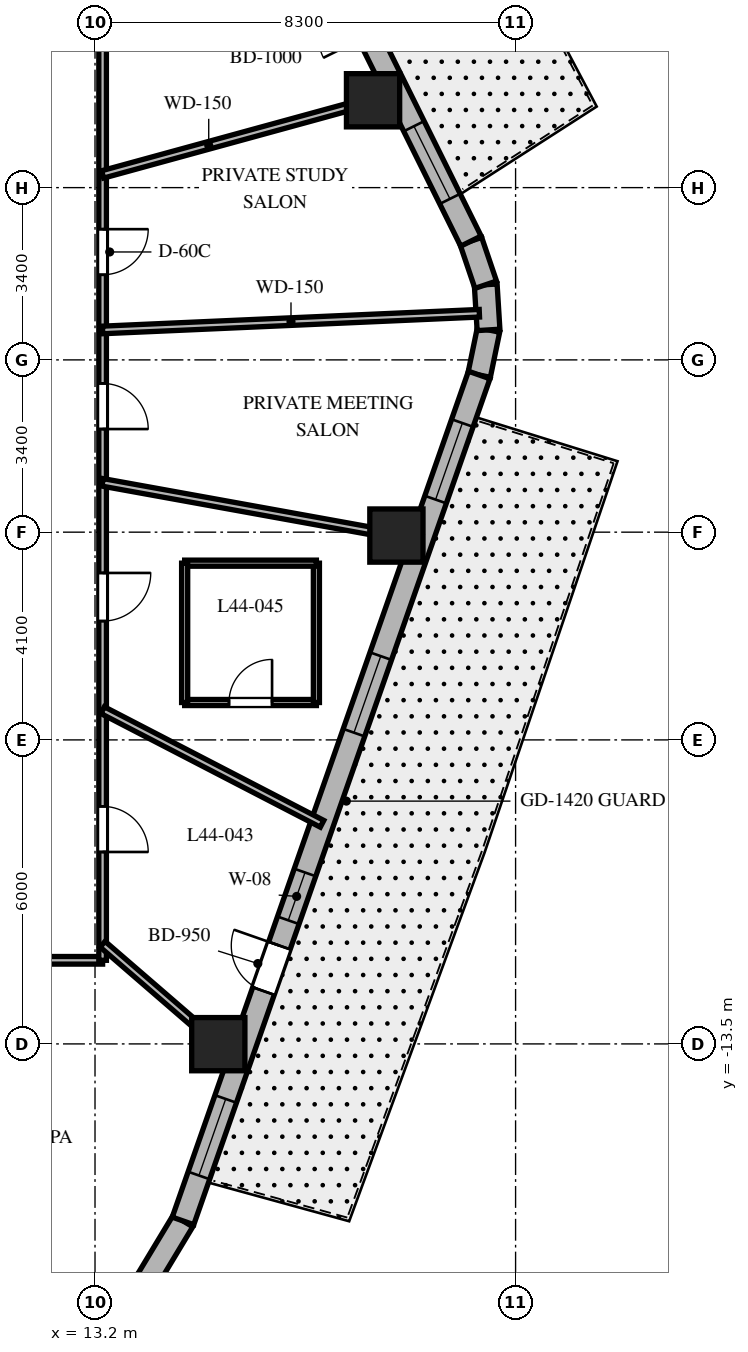
"""IFC4 building model, lengths in metres.
Left out: names, types, materials, properties, quantities, classifications, styles, units other than length and angle.
Written with IfcOpenShell. Run it as: python <this file> out.ifc"""

import sys

from ifc_helpers import new_model, si_unit, direction, frame, frame_2d, origin, origin_2d, place, context, subcontext, project, spatial, rectangle, extrude, element, fill, save


model = new_model("IFC4")
c1 = context("Model", 3, precision=1e-05, world=origin(), true_north=direction((0.0, 1.0)))
c2 = subcontext(c1, "Body", "Model", "MODEL_VIEW")
j1 = project(units=[si_unit("LENGTHUNIT", "METRE"), si_unit("PLANEANGLEUNIT", "RADIAN")], contexts=[c1])
p1 = place(None, origin())
s1 = spatial("IfcSite", under=j1, at=p1, CompositionType="ELEMENT")
p2 = place(p1, origin())
s2 = spatial("IfcBuilding", under=s1, at=p2, CompositionType="ELEMENT")
p3 = place(p2, frame((0.0, 0.0, 179.3)))
s3 = spatial("IfcBuildingStorey", under=s2, at=p3, CompositionType="ELEMENT", Elevation=179.3)
for number, where, z_axis, x_axis in (
    (1, (15.633, -13.505, 0.0), (0.0, 0.0, 1.0), (1.0, 0.0, 0.0)),
    (2, (19.148, -3.467, 0.0), (0.0, 0.0, 1.0), (1.0, 0.0, 0.0)),
    (3, (18.687, 5.124, 0.0), (0.0, 0.0, 1.0), (1.0, 0.0, 0.0)),
):
    element("IfcColumn", number, at=place(p3, frame(where, z_axis=z_axis, x_axis=x_axis)), inside=s3, PredefinedType="COLUMN", context=c2, shape_type="SweptSolid", body=[
        extrude(rectangle(XDim=1.05, YDim=1.05, at=origin_2d()), origin(), (0.0, 0.0, 1.0), 3.7),
    ])
p4 = place(p3, frame((14.214, -18.192, 0.0), z_axis=(0.0, 0.0, 1.0), x_axis=(0.516340945502, 0.856383108193, 0.0)))
e4 = element("IfcWall", 4, at=p4, inside=s3, PredefinedType="SOLIDWALL", context=c2, shape_type="SweptSolid", body=[
    extrude(rectangle(XDim=1.4, YDim=0.45, at=frame_2d((0.7, 0.0))), origin(), (0.0, 0.0, 1.0), 3.4),
])
p5 = place(p3, frame((20.782, -0.298, 0.0), z_axis=(0.0, 0.0, 1.0), x_axis=(0.202570068411, 0.979267771033, 0.0)))
e5 = element("IfcWall", 5, at=p5, inside=s3, PredefinedType="SOLIDWALL", context=c2, shape_type="SweptSolid", body=[
    extrude(rectangle(XDim=0.909, YDim=0.45, at=frame_2d((0.454, 0.0))), origin(), (0.0, 0.0, 1.0), 3.4),
])
p6 = place(p3, frame((20.966, 0.592, 0.0), z_axis=(0.0, 0.0, 1.0), x_axis=(-0.061748898935, 0.998091715966, 0.0)))
e6 = element("IfcWall", 6, at=p6, inside=s3, PredefinedType="SOLIDWALL", context=c2, shape_type="SweptSolid", body=[
    extrude(rectangle(XDim=0.894, YDim=0.45, at=frame_2d((0.447, 0.0))), origin(), (0.0, 0.0, 1.0), 3.4),
])
p7 = place(p3, frame((20.911, 1.484, 0.0), z_axis=(0.0, 0.0, 1.0), x_axis=(-0.321623334353, 0.946867694453, 0.0)))
e7 = element("IfcWall", 7, at=p7, inside=s3, PredefinedType="SOLIDWALL", context=c2, shape_type="SweptSolid", body=[
    extrude(rectangle(XDim=0.909, YDim=0.45, at=frame_2d((0.454, 0.0))), origin(), (0.0, 0.0, 1.0), 3.4),
])
p8 = place(p3, frame((14.937, -16.993, 0.0), z_axis=(0.0, 0.0, 1.0), x_axis=(0.330431575061, 0.943829949834, 0.0)))
e8 = element("IfcWall", 8, at=p8, inside=s3, PredefinedType="SOLIDWALL", context=c2, shape_type="SweptSolid", body=[
    extrude(rectangle(XDim=17.689, YDim=0.45, at=frame_2d((8.844, 0.0))), origin(), (0.0, 0.0, 1.0), 3.4),
])
p9 = place(p8, frame((4.807, 0.0, 0.0)))
e9 = element("IfcOpeningElement", 9, at=p9, cuts=e8, PredefinedType="OPENING", context=c2, shape_type="SweptSolid", body=[
    extrude(rectangle(XDim=0.95, YDim=2.15, at=frame_2d((0.475, 1.075))), frame((0.0, 0.235, 0.0), z_axis=(0.0, -1.0, 0.0), x_axis=(1.0, 0.0, 0.0)), (0.0, 0.0, 1.0), 0.47),
])
p10 = place(p8, frame((0.95, 0.0, 0.8)))
e10 = element("IfcOpeningElement", 10, at=p10, cuts=e8, PredefinedType="OPENING", context=c2, shape_type="SweptSolid", body=[
    extrude(rectangle(XDim=1.6, YDim=1.75, at=frame_2d((0.8, 0.875))), frame((0.0, 0.235, 0.0), z_axis=(0.0, -1.0, 0.0), x_axis=(1.0, 0.0, 0.0)), (0.0, 0.0, 1.0), 0.47),
])
p11 = place(p8, frame((6.286, 0.0, 0.8)))
e11 = element("IfcOpeningElement", 11, at=p11, cuts=e8, PredefinedType="OPENING", context=c2, shape_type="SweptSolid", body=[
    extrude(rectangle(XDim=1.0, YDim=1.65, at=frame_2d((0.5, 0.825))), frame((0.0, 0.235, 0.0), z_axis=(0.0, -1.0, 0.0), x_axis=(1.0, 0.0, 0.0)), (0.0, 0.0, 1.0), 0.47),
])
p12 = place(p8, frame((10.21, 0.0, 0.8)))
e12 = element("IfcOpeningElement", 12, at=p12, cuts=e8, PredefinedType="OPENING", context=c2, shape_type="SweptSolid", body=[
    extrude(rectangle(XDim=1.6, YDim=1.75, at=frame_2d((0.8, 0.875))), frame((0.0, 0.235, 0.0), z_axis=(0.0, -1.0, 0.0), x_axis=(1.0, 0.0, 0.0)), (0.0, 0.0, 1.0), 0.47),
])
p13 = place(p8, frame((15.084, 0.0, 0.8)))
e13 = element("IfcOpeningElement", 13, at=p13, cuts=e8, PredefinedType="OPENING", context=c2, shape_type="SweptSolid", body=[
    extrude(rectangle(XDim=1.6, YDim=1.75, at=frame_2d((0.8, 0.875))), frame((0.0, 0.235, 0.0), z_axis=(0.0, -1.0, 0.0), x_axis=(1.0, 0.0, 0.0)), (0.0, 0.0, 1.0), 0.47),
])
p14 = place(p3, frame((20.618, 2.344, 0.0), z_axis=(0.0, 0.0, 1.0), x_axis=(-0.444243691097, 0.895905990002, 0.0)))
e14 = element("IfcWall", 14, at=p14, inside=s3, PredefinedType="SOLIDWALL", context=c2, shape_type="SweptSolid", body=[
    extrude(rectangle(XDim=16.784, YDim=0.45, at=frame_2d((8.392, 0.0))), origin(), (0.0, 0.0, 1.0), 3.4),
])
p15 = place(p14, frame((4.535, 0.0, 0.0)))
e15 = element("IfcOpeningElement", 15, at=p15, cuts=e14, PredefinedType="OPENING", context=c2, shape_type="SweptSolid", body=[
    extrude(rectangle(XDim=1.0, YDim=2.15, at=frame_2d((0.5, 1.075))), frame((0.0, 0.235, 0.0), z_axis=(0.0, -1.0, 0.0), x_axis=(1.0, 0.0, 0.0)), (0.0, 0.0, 1.0), 0.47),
])
p16 = place(p14, frame((0.931, 0.0, 0.8)))
e16 = element("IfcOpeningElement", 16, at=p16, cuts=e14, PredefinedType="OPENING", context=c2, shape_type="SweptSolid", body=[
    extrude(rectangle(XDim=1.6, YDim=1.75, at=frame_2d((0.8, 0.875))), frame((0.0, 0.235, 0.0), z_axis=(0.0, -1.0, 0.0), x_axis=(1.0, 0.0, 0.0)), (0.0, 0.0, 1.0), 0.47),
])
p17 = place(p14, frame((7.642, 0.0, 0.8)))
e17 = element("IfcOpeningElement", 17, at=p17, cuts=e14, PredefinedType="OPENING", context=c2, shape_type="SweptSolid", body=[
    extrude(rectangle(XDim=1.6, YDim=1.75, at=frame_2d((0.8, 0.875))), frame((0.0, 0.235, 0.0), z_axis=(0.0, -1.0, 0.0), x_axis=(1.0, 0.0, 0.0)), (0.0, 0.0, 1.0), 0.47),
])
p18 = place(p14, frame((14.303, 0.0, 0.8)))
e18 = element("IfcOpeningElement", 18, at=p18, cuts=e14, PredefinedType="OPENING", context=c2, shape_type="SweptSolid", body=[
    extrude(rectangle(XDim=1.6, YDim=1.75, at=frame_2d((0.8, 0.875))), frame((0.0, 0.235, 0.0), z_axis=(0.0, -1.0, 0.0), x_axis=(1.0, 0.0, 0.0)), (0.0, 0.0, 1.0), 0.47),
])
p19 = place(p3, frame((13.35, -11.85, 0.0), z_axis=(0.0, 0.0, 1.0), x_axis=(-1.0, 0.0, 0.0)))
e19 = element("IfcWall", 19, at=p19, inside=s3, PredefinedType="PARTITIONING", context=c2, shape_type="SweptSolid", body=[
    extrude(rectangle(XDim=26.7, YDim=0.15, at=frame_2d((13.35, 0.0))), origin(), (0.0, 0.0, 1.0), 2.84),
])
p20 = place(p19, frame((22.7, 0.0, 0.0)))
e20 = element("IfcOpeningElement", 20, at=p20, cuts=e19, PredefinedType="OPENING", context=c2, shape_type="SweptSolid", body=[
    extrude(rectangle(XDim=0.9, YDim=2.03, at=frame_2d((0.45, 1.015))), frame((0.0, 0.085, 0.0), z_axis=(0.0, -1.0, 0.0), x_axis=(1.0, 0.0, 0.0)), (0.0, 0.0, 1.0), 0.17),
])
p21 = place(p19, frame((18.523, 0.0, 0.0)))
e21 = element("IfcOpeningElement", 21, at=p21, cuts=e19, PredefinedType="OPENING", context=c2, shape_type="SweptSolid", body=[
    extrude(rectangle(XDim=0.95, YDim=2.03, at=frame_2d((0.475, 1.015))), frame((0.0, 0.085, 0.0), z_axis=(0.0, -1.0, 0.0), x_axis=(1.0, 0.0, 0.0)), (0.0, 0.0, 1.0), 0.17),
])
p22 = place(p19, frame((14.469, 0.0, 0.0)))
e22 = element("IfcOpeningElement", 22, at=p22, cuts=e19, PredefinedType="OPENING", context=c2, shape_type="SweptSolid", body=[
    extrude(rectangle(XDim=0.95, YDim=2.03, at=frame_2d((0.475, 1.015))), frame((0.0, 0.085, 0.0), z_axis=(0.0, -1.0, 0.0), x_axis=(1.0, 0.0, 0.0)), (0.0, 0.0, 1.0), 0.17),
])
p23 = place(p19, frame((10.314, 0.0, 0.0)))
e23 = element("IfcOpeningElement", 23, at=p23, cuts=e19, PredefinedType="OPENING", context=c2, shape_type="SweptSolid", body=[
    extrude(rectangle(XDim=0.95, YDim=2.03, at=frame_2d((0.475, 1.015))), frame((0.0, 0.085, 0.0), z_axis=(0.0, -1.0, 0.0), x_axis=(1.0, 0.0, 0.0)), (0.0, 0.0, 1.0), 0.17),
])
p24 = place(p19, frame((3.995, 0.0, 0.0)))
e24 = element("IfcOpeningElement", 24, at=p24, cuts=e19, PredefinedType="OPENING", context=c2, shape_type="SweptSolid", body=[
    extrude(rectangle(XDim=0.95, YDim=2.03, at=frame_2d((0.475, 1.015))), frame((0.0, 0.085, 0.0), z_axis=(0.0, -1.0, 0.0), x_axis=(1.0, 0.0, 0.0)), (0.0, 0.0, 1.0), 0.17),
])
p25 = place(p3, frame((13.35, 11.85, 0.0), z_axis=(0.0, 0.0, 1.0), x_axis=(0.0, -1.0, 0.0)))
e25 = element("IfcWall", 25, at=p25, inside=s3, PredefinedType="PARTITIONING", context=c2, shape_type="SweptSolid", body=[
    extrude(rectangle(XDim=23.7, YDim=0.15, at=frame_2d((11.85, 0.0))), origin(), (0.0, 0.0, 1.0), 2.84),
])
p26 = place(p25, frame((9.27, 0.0, 0.0)))
e26 = element("IfcOpeningElement", 26, at=p26, cuts=e25, PredefinedType="OPENING", context=c2, shape_type="SweptSolid", body=[
    extrude(rectangle(XDim=0.9, YDim=2.03, at=frame_2d((0.45, 1.015))), frame((0.0, 0.085, 0.0), z_axis=(0.0, -1.0, 0.0), x_axis=(1.0, 0.0, 0.0)), (0.0, 0.0, 1.0), 0.17),
])
p27 = place(p25, frame((3.765, 0.0, 0.0)))
e27 = element("IfcOpeningElement", 27, at=p27, cuts=e25, PredefinedType="OPENING", context=c2, shape_type="SweptSolid", body=[
    extrude(rectangle(XDim=0.9, YDim=2.03, at=frame_2d((0.45, 1.015))), frame((0.0, 0.085, 0.0), z_axis=(0.0, -1.0, 0.0), x_axis=(1.0, 0.0, 0.0)), (0.0, 0.0, 1.0), 0.17),
])
p28 = place(p25, frame((20.662, 0.0, 0.0)))
e28 = element("IfcOpeningElement", 28, at=p28, cuts=e25, PredefinedType="OPENING", context=c2, shape_type="SweptSolid", body=[
    extrude(rectangle(XDim=0.9, YDim=2.03, at=frame_2d((0.45, 1.015))), frame((0.0, 0.085, 0.0), z_axis=(0.0, -1.0, 0.0), x_axis=(1.0, 0.0, 0.0)), (0.0, 0.0, 1.0), 0.17),
])
p29 = place(p25, frame((16.055, 0.0, 0.0)))
e29 = element("IfcOpeningElement", 29, at=p29, cuts=e25, PredefinedType="OPENING", context=c2, shape_type="SweptSolid", body=[
    extrude(rectangle(XDim=0.95, YDim=2.03, at=frame_2d((0.475, 1.015))), frame((0.0, 0.085, 0.0), z_axis=(0.0, -1.0, 0.0), x_axis=(1.0, 0.0, 0.0)), (0.0, 0.0, 1.0), 0.17),
])
p30 = place(p25, frame((12.315, 0.0, 0.0)))
e30 = element("IfcOpeningElement", 30, at=p30, cuts=e25, PredefinedType="OPENING", context=c2, shape_type="SweptSolid", body=[
    extrude(rectangle(XDim=0.9, YDim=2.03, at=frame_2d((0.45, 1.015))), frame((0.0, 0.085, 0.0), z_axis=(0.0, -1.0, 0.0), x_axis=(1.0, 0.0, 0.0)), (0.0, 0.0, 1.0), 0.17),
])
p31 = place(p3, frame((13.35, 0.591, 0.0), z_axis=(0.0, 0.0, 1.0), x_axis=(0.999020359631, 0.044252921296, 0.0)))
e31 = element("IfcWall", 31, at=p31, inside=s3, PredefinedType="PARTITIONING", context=c2, shape_type="SweptSolid", body=[
    extrude(rectangle(XDim=7.442, YDim=0.15, at=frame_2d((3.721, 0.0))), origin(), (0.0, 0.0, 1.0), 2.64),
])
p32 = place(p3, frame((13.35, 3.661, 0.0), z_axis=(0.0, 0.0, 1.0), x_axis=(0.964397145454, 0.264458211898, 0.0)))
e32 = element("IfcWall", 32, at=p32, inside=s3, PredefinedType="PARTITIONING", context=c2, shape_type="SweptSolid", body=[
    extrude(rectangle(XDim=6.039, YDim=0.15, at=frame_2d((3.019, 0.0))), origin(), (0.0, 0.0, 1.0), 2.64),
])
p33 = place(p3, frame((13.35, -11.533, 0.0), z_axis=(0.0, 0.0, 1.0), x_axis=(0.756711647314, -0.65374879183, 0.0)))
e33 = element("IfcWall", 33, at=p33, inside=s3, PredefinedType="PARTITIONING", context=c2, shape_type="SweptSolid", body=[
    extrude(rectangle(XDim=3.55, YDim=0.15, at=frame_2d((1.775, 0.0))), origin(), (0.0, 0.0, 1.0), 2.64),
])
p34 = place(p3, frame((13.35, -6.913, 0.0), z_axis=(0.0, 0.0, 1.0), x_axis=(0.887989298603, -0.459864116415, 0.0)))
e34 = element("IfcWall", 34, at=p34, inside=s3, PredefinedType="PARTITIONING", context=c2, shape_type="SweptSolid", body=[
    extrude(rectangle(XDim=4.877, YDim=0.15, at=frame_2d((2.438, 0.0))), origin(), (0.0, 0.0, 1.0), 2.64),
])
p35 = place(p3, frame((13.35, -2.417, 0.0), z_axis=(0.0, 0.0, 1.0), x_axis=(0.98399796473, -0.178179699761, 0.0)))
e35 = element("IfcWall", 35, at=p35, inside=s3, PredefinedType="PARTITIONING", context=c2, shape_type="SweptSolid", body=[
    extrude(rectangle(XDim=6.393, YDim=0.15, at=frame_2d((3.197, 0.0))), origin(), (0.0, 0.0, 1.0), 2.64),
])
p36 = place(p3, frame((14.969, -6.762, 0.0), z_axis=(0.0, 0.0, 1.0), x_axis=(1.0, 0.0, 0.0)))
e36 = element("IfcWall", 36, at=p36, inside=s3, PredefinedType="PARTITIONING", context=c2, shape_type="SweptSolid", body=[
    extrude(rectangle(XDim=2.6, YDim=0.12, at=frame_2d((1.3, 0.0))), origin(), (0.0, 0.0, 1.0), 2.972),
])
p37 = place(p36, frame((0.875, 0.0, 0.0)))
e37 = element("IfcOpeningElement", 37, at=p37, cuts=e36, PredefinedType="OPENING", context=c2, shape_type="SweptSolid", body=[
    extrude(rectangle(XDim=0.85, YDim=2.03, at=frame_2d((0.425, 1.015))), frame((0.0, 0.07, 0.0), z_axis=(0.0, -1.0, 0.0), x_axis=(1.0, 0.0, 0.0)), (0.0, 0.0, 1.0), 0.14),
])
p38 = place(p3, frame((17.569, -6.762, 0.0), z_axis=(0.0, 0.0, 1.0), x_axis=(0.0, 1.0, 0.0)))
e38 = element("IfcWall", 38, at=p38, inside=s3, PredefinedType="PARTITIONING", context=c2, shape_type="SweptSolid", body=[
    extrude(rectangle(XDim=2.75, YDim=0.12, at=frame_2d((1.375, 0.0))), origin(), (0.0, 0.0, 1.0), 2.84),
])
p39 = place(p3, frame((17.569, -4.012, 0.0), z_axis=(0.0, 0.0, 1.0), x_axis=(-1.0, 0.0, 0.0)))
e39 = element("IfcWall", 39, at=p39, inside=s3, PredefinedType="PARTITIONING", context=c2, shape_type="SweptSolid", body=[
    extrude(rectangle(XDim=2.6, YDim=0.12, at=frame_2d((1.3, 0.0))), origin(), (0.0, 0.0, 1.0), 2.84),
])
p40 = place(p3, frame((14.969, -4.012, 0.0), z_axis=(0.0, 0.0, 1.0), x_axis=(0.0, -1.0, 0.0)))
e40 = element("IfcWall", 40, at=p40, inside=s3, PredefinedType="PARTITIONING", context=c2, shape_type="SweptSolid", body=[
    extrude(rectangle(XDim=2.75, YDim=0.12, at=frame_2d((1.375, 0.0))), origin(), (0.0, 0.0, 1.0), 2.84),
])
p41 = place(p9, origin())
e41 = element("IfcDoor", 41, at=p41, inside=s3, OperationType="SINGLE_SWING_RIGHT", PredefinedType="DOOR", context=c2, shape_type="SweptSolid", body=[
    extrude(rectangle(XDim=0.95, YDim=2.15, at=frame_2d((0.475, 1.075))), frame((0.0, 0.025, 0.0), z_axis=(0.0, -1.0, 0.0), x_axis=(1.0, 0.0, 0.0)), (0.0, 0.0, 1.0), 0.05),
])
fill(e9, e41)
p42 = place(p10, origin())
e42 = element("IfcWindow", 42, at=p42, inside=s3, PartitioningType="SINGLE_PANEL", PredefinedType="WINDOW", context=c2, shape_type="SweptSolid", body=[
    extrude(rectangle(XDim=1.6, YDim=1.75, at=frame_2d((0.8, 0.875))), frame((0.0, 0.03, 0.0), z_axis=(0.0, -1.0, 0.0), x_axis=(1.0, 0.0, 0.0)), (0.0, 0.0, 1.0), 0.06),
])
fill(e10, e42)
p43 = place(p11, origin())
e43 = element("IfcWindow", 43, at=p43, inside=s3, PartitioningType="SINGLE_PANEL", PredefinedType="WINDOW", context=c2, shape_type="SweptSolid", body=[
    extrude(rectangle(XDim=1.0, YDim=1.65, at=frame_2d((0.5, 0.825))), frame((0.0, 0.03, 0.0), z_axis=(0.0, -1.0, 0.0), x_axis=(1.0, 0.0, 0.0)), (0.0, 0.0, 1.0), 0.06),
])
fill(e11, e43)
p44 = place(p12, origin())
e44 = element("IfcWindow", 44, at=p44, inside=s3, PartitioningType="SINGLE_PANEL", PredefinedType="WINDOW", context=c2, shape_type="SweptSolid", body=[
    extrude(rectangle(XDim=1.6, YDim=1.75, at=frame_2d((0.8, 0.875))), frame((0.0, 0.03, 0.0), z_axis=(0.0, -1.0, 0.0), x_axis=(1.0, 0.0, 0.0)), (0.0, 0.0, 1.0), 0.06),
])
fill(e12, e44)
p45 = place(p13, origin())
e45 = element("IfcWindow", 45, at=p45, inside=s3, PartitioningType="SINGLE_PANEL", PredefinedType="WINDOW", context=c2, shape_type="SweptSolid", body=[
    extrude(rectangle(XDim=1.6, YDim=1.75, at=frame_2d((0.8, 0.875))), frame((0.0, 0.03, 0.0), z_axis=(0.0, -1.0, 0.0), x_axis=(1.0, 0.0, 0.0)), (0.0, 0.0, 1.0), 0.06),
])
fill(e13, e45)
p46 = place(p16, origin())
e46 = element("IfcWindow", 46, at=p46, inside=s3, PartitioningType="SINGLE_PANEL", PredefinedType="WINDOW", context=c2, shape_type="SweptSolid", body=[
    extrude(rectangle(XDim=1.6, YDim=1.75, at=frame_2d((0.8, 0.875))), frame((0.0, 0.03, 0.0), z_axis=(0.0, -1.0, 0.0), x_axis=(1.0, 0.0, 0.0)), (0.0, 0.0, 1.0), 0.06),
])
fill(e16, e46)
p47 = place(p26, origin())
e47 = element("IfcDoor", 47, at=p47, inside=s3, OperationType="SINGLE_SWING_LEFT", PredefinedType="DOOR", context=c2, shape_type="SweptSolid", body=[
    extrude(rectangle(XDim=0.9, YDim=2.03, at=frame_2d((0.45, 1.015))), frame((0.0, 0.025, 0.0), z_axis=(0.0, -1.0, 0.0), x_axis=(1.0, 0.0, 0.0)), (0.0, 0.0, 1.0), 0.05),
])
fill(e26, e47)
p48 = place(p28, origin())
e48 = element("IfcDoor", 48, at=p48, inside=s3, OperationType="SINGLE_SWING_RIGHT", PredefinedType="DOOR", context=c2, shape_type="SweptSolid", body=[
    extrude(rectangle(XDim=0.9, YDim=2.03, at=frame_2d((0.45, 1.015))), frame((0.0, 0.025, 0.0), z_axis=(0.0, -1.0, 0.0), x_axis=(1.0, 0.0, 0.0)), (0.0, 0.0, 1.0), 0.05),
])
fill(e28, e48)
p49 = place(p29, origin())
e49 = element("IfcDoor", 49, at=p49, inside=s3, OperationType="SINGLE_SWING_LEFT", PredefinedType="DOOR", context=c2, shape_type="SweptSolid", body=[
    extrude(rectangle(XDim=0.95, YDim=2.03, at=frame_2d((0.475, 1.015))), frame((0.0, 0.025, 0.0), z_axis=(0.0, -1.0, 0.0), x_axis=(1.0, 0.0, 0.0)), (0.0, 0.0, 1.0), 0.05),
])
fill(e29, e49)
p50 = place(p37, origin())
e50 = element("IfcDoor", 50, at=p50, inside=s3, OperationType="SINGLE_SWING_RIGHT", PredefinedType="DOOR", context=c2, shape_type="SweptSolid", body=[
    extrude(rectangle(XDim=0.85, YDim=2.03, at=frame_2d((0.425, 1.015))), frame((0.0, 0.025, 0.0), z_axis=(0.0, -1.0, 0.0), x_axis=(1.0, 0.0, 0.0)), (0.0, 0.0, 1.0), 0.05),
])
fill(e37, e50)
p51 = place(p30, origin())
e51 = element("IfcDoor", 51, at=p51, inside=s3, OperationType="SINGLE_SWING_RIGHT", PredefinedType="DOOR", context=c2, shape_type="SweptSolid", body=[
    extrude(rectangle(XDim=0.9, YDim=2.03, at=frame_2d((0.45, 1.015))), frame((0.0, 0.025, 0.0), z_axis=(0.0, -1.0, 0.0), x_axis=(1.0, 0.0, 0.0)), (0.0, 0.0, 1.0), 0.05),
])
fill(e30, e51)
save(model, sys.argv[1])
